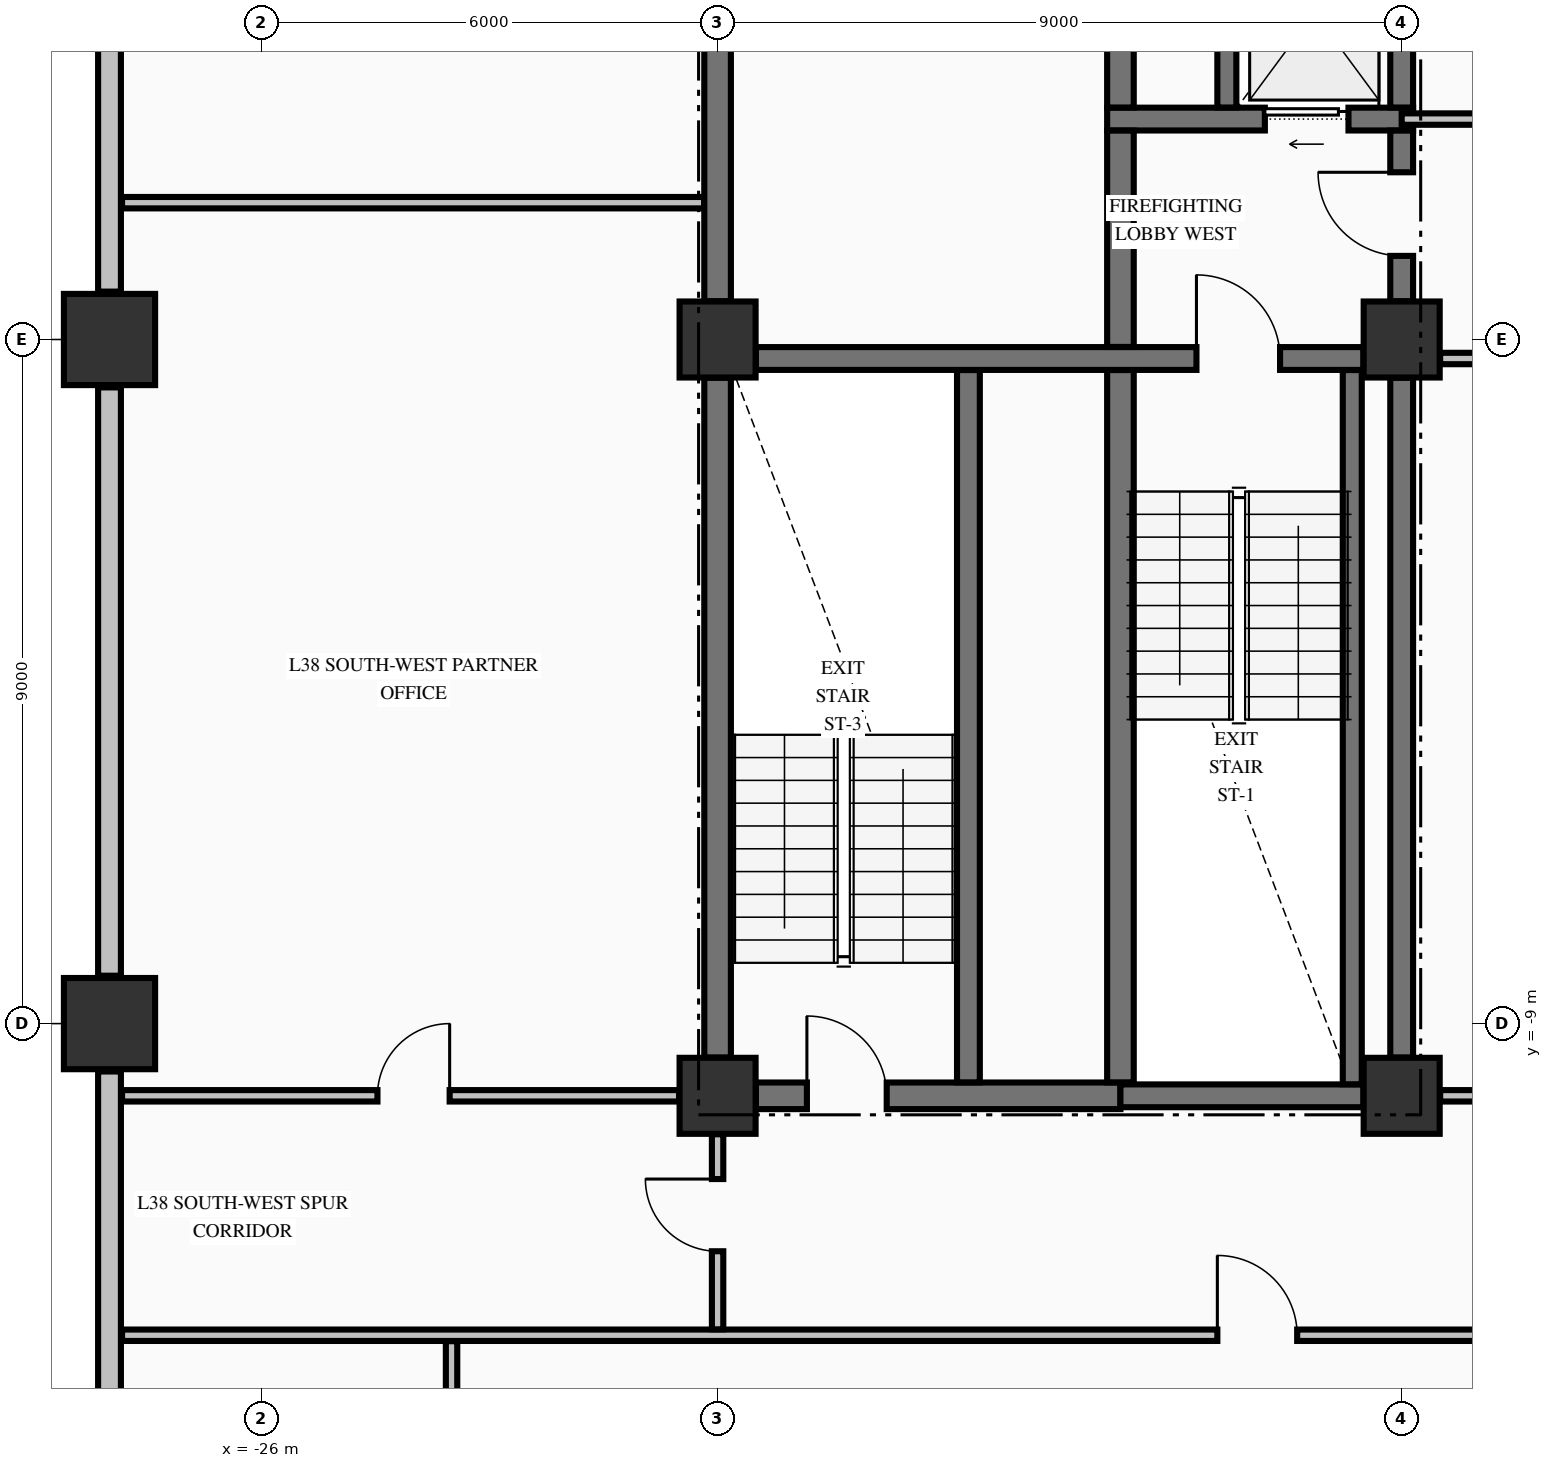
"""IFC4 building model, lengths in metres.
Left out: names, types, materials, properties, quantities, classifications, styles, units other than length and angle.
Written with IfcOpenShell. Run it as: python <this file> out.ifc"""

import sys

from ifc_helpers import new_model, si_unit, direction, frame, frame_2d, origin, origin_2d, place, context, subcontext, project, spatial, rectangle, extrude, element, fill, save


model = new_model("IFC4")
c1 = context("Model", 3, precision=1e-05, world=origin(), true_north=direction((0.0, 1.0)))
c2 = subcontext(c1, "Body", "Model", "MODEL_VIEW")
j1 = project(units=[si_unit("LENGTHUNIT", "METRE"), si_unit("PLANEANGLEUNIT", "RADIAN")], contexts=[c1])
p1 = place(None, origin())
s1 = spatial("IfcSite", under=j1, at=p1, CompositionType="ELEMENT")
p2 = place(p1, origin())
s2 = spatial("IfcBuilding", under=s1, at=p2, CompositionType="ELEMENT")
p3 = place(p2, frame((0.0, 0.0, 149.91)))
s3 = spatial("IfcBuildingStorey", under=s2, at=p3, CompositionType="ELEMENT", Elevation=149.91)
for number, where, z_axis, x_axis in (
    (1, (-28.0, -9.0, -0.25), (0.0, 0.0, 1.0), (1.0, 0.0, 0.0)),
    (2, (-28.0, 0.0, -0.25), (0.0, 0.0, 1.0), (1.0, 0.0, 0.0)),
):
    element("IfcColumn", number, at=place(p3, frame(where, z_axis=z_axis, x_axis=x_axis)), inside=s3, PredefinedType="COLUMN", context=c2, shape_type="SweptSolid", body=[
        extrude(rectangle(XDim=1.2, YDim=1.2, at=origin_2d()), origin(), (0.0, 0.0, 1.0), 3.395),
    ])
for number, where, z_axis, x_axis in (
    (3, (-20.0, -9.95, -0.25), (0.0, 0.0, 1.0), (1.0, 0.0, 0.0)),
    (4, (-11.0, -9.95, -0.25), (0.0, 0.0, 1.0), (1.0, 0.0, 0.0)),
    (5, (-11.0, 0.0, -0.25), (0.0, 0.0, 1.0), (1.0, 0.0, 0.0)),
    (6, (-20.0, 0.0, -0.25), (0.0, 0.0, 1.0), (1.0, 0.0, 0.0)),
):
    element("IfcColumn", number, at=place(p3, frame(where, z_axis=z_axis, x_axis=x_axis)), inside=s3, PredefinedType="COLUMN", context=c2, shape_type="SweptSolid", body=[
        extrude(rectangle(XDim=1.0, YDim=1.0, at=origin_2d()), origin(), (0.0, 0.0, 1.0), 3.395),
    ])
p4 = place(p3, frame((-28.0, -9.63, 0.0), z_axis=(0.0, 0.0, 1.0), x_axis=(0.0, -1.0, 0.0)))
e7 = element("IfcWall", 7, at=p4, inside=s3, PredefinedType="STANDARD", context=c2, shape_type="SweptSolid", body=[
    extrude(rectangle(XDim=10.74, YDim=0.3, at=frame_2d((5.37, 0.0))), origin(), (0.0, 0.0, 1.0), 2.537),
])
for number, where, z_axis, x_axis in (
    (8, (-28.0, -0.63, 0.0), (0.0, 0.0, 1.0), (0.0, -1.0, 0.0)),
    (9, (-28.0, 8.37, 0.0), (0.0, 0.0, 1.0), (0.0, -1.0, 0.0)),
):
    element("IfcWall", number, at=place(p3, frame(where, z_axis=z_axis, x_axis=x_axis)), inside=s3, PredefinedType="STANDARD", context=c2, shape_type="SweptSolid", body=[
        extrude(rectangle(XDim=7.74, YDim=0.3, at=frame_2d((3.87, 0.0))), origin(), (0.0, 0.0, 1.0), 2.537),
    ])
p5 = place(p3, frame((-19.496, -9.95, 0.0), z_axis=(0.0, 0.0, 1.0), x_axis=(1.0, 0.0, 0.0)))
e10 = element("IfcWall", 10, at=p5, inside=s3, PredefinedType="SHEAR", context=c2, shape_type="SweptSolid", body=[
    extrude(rectangle(XDim=4.796, YDim=0.35, at=frame_2d((2.398, 0.0))), origin(), (0.0, 0.0, 1.0), 3.145),
])
p6 = place(p5, frame((0.671, 0.0, 0.0)))
e11 = element("IfcOpeningElement", 11, at=p6, cuts=e10, PredefinedType="OPENING", context=c2, shape_type="SweptSolid", body=[
    extrude(rectangle(XDim=1.05, YDim=2.15, at=frame_2d((0.525, 1.075))), frame((0.0, 0.185, 0.0), z_axis=(0.0, -1.0, 0.0), x_axis=(1.0, 0.0, 0.0)), (0.0, 0.0, 1.0), 0.37),
])
p7 = place(p3, frame((-14.7, -9.95, 0.0), z_axis=(0.0, 0.0, 1.0), x_axis=(1.0, 0.0, 0.0)))
e12 = element("IfcWall", 12, at=p7, inside=s3, PredefinedType="SHEAR", context=c2, shape_type="SweptSolid", body=[
    extrude(rectangle(XDim=3.196, YDim=0.3, at=frame_2d((1.598, 0.0))), origin(), (0.0, 0.0, 1.0), 3.145),
])
p8 = place(p3, frame((-19.496, -0.25, 0.0), z_axis=(0.0, 0.0, 1.0), x_axis=(1.0, 0.0, 0.0)))
e13 = element("IfcWall", 13, at=p8, inside=s3, PredefinedType="SHEAR", context=c2, shape_type="SweptSolid", body=[
    extrude(rectangle(XDim=7.992, YDim=0.3, at=frame_2d((3.996, 0.0))), origin(), (0.0, 0.0, 1.0), 3.145),
])
p9 = place(p8, frame((5.796, 0.0, 0.0)))
e14 = element("IfcOpeningElement", 14, at=p9, cuts=e13, PredefinedType="OPENING", context=c2, shape_type="SweptSolid", body=[
    extrude(rectangle(XDim=1.1, YDim=2.15, at=frame_2d((0.55, 1.075))), frame((0.0, 0.16, 0.0), z_axis=(0.0, -1.0, 0.0), x_axis=(1.0, 0.0, 0.0)), (0.0, 0.0, 1.0), 0.32),
])
p10 = place(p3, frame((-14.875, 2.9, 0.0), z_axis=(0.0, 0.0, 1.0), x_axis=(1.0, 0.0, 0.0)))
e15 = element("IfcWall", 15, at=p10, inside=s3, PredefinedType="SHEAR", context=c2, shape_type="SweptSolid", body=[
    extrude(rectangle(XDim=4.025, YDim=0.3, at=frame_2d((2.012, 0.0))), origin(), (0.0, 0.0, 1.0), 3.145),
])
p11 = place(p10, frame((2.075, 0.0, 0.0)))
e16 = element("IfcOpeningElement", 16, at=p11, cuts=e15, PredefinedType="OPENING", context=c2, shape_type="SweptSolid", body=[
    extrude(rectangle(XDim=1.1, YDim=2.2, at=frame_2d((0.55, 1.1))), frame((0.0, 0.16, 0.0), z_axis=(0.0, -1.0, 0.0), x_axis=(1.0, 0.0, 0.0)), (0.0, 0.0, 1.0), 0.32),
])
p12 = place(p3, frame((-27.835, -13.1, 0.0), z_axis=(0.0, 0.0, 1.0), x_axis=(1.0, 0.0, 0.0)))
e17 = element("IfcWall", 17, at=p12, inside=s3, PredefinedType="PARTITIONING", context=c2, shape_type="SweptSolid", body=[
    extrude(rectangle(XDim=50.67, YDim=0.15, at=frame_2d((25.335, 0.0))), origin(), (0.0, 0.0, 1.0), 3.145),
])
p13 = place(p12, frame((29.685, 0.0, 0.0)))
e18 = element("IfcOpeningElement", 18, at=p13, cuts=e17, PredefinedType="OPENING", context=c2, shape_type="SweptSolid", body=[
    extrude(rectangle(XDim=1.1, YDim=2.15, at=frame_2d((0.55, 1.075))), frame((0.0, 0.085, 0.0), z_axis=(0.0, -1.0, 0.0), x_axis=(1.0, 0.0, 0.0)), (0.0, 0.0, 1.0), 0.17),
])
p14 = place(p12, frame((14.41, 0.0, 0.0)))
e19 = element("IfcOpeningElement", 19, at=p14, cuts=e17, PredefinedType="OPENING", context=c2, shape_type="SweptSolid", body=[
    extrude(rectangle(XDim=1.05, YDim=2.15, at=frame_2d((0.525, 1.075))), frame((0.0, 0.085, 0.0), z_axis=(0.0, -1.0, 0.0), x_axis=(1.0, 0.0, 0.0)), (0.0, 0.0, 1.0), 0.17),
])
p15 = place(p12, frame((34.96, 0.0, 0.0)))
e20 = element("IfcOpeningElement", 20, at=p15, cuts=e17, PredefinedType="OPENING", context=c2, shape_type="SweptSolid", body=[
    extrude(rectangle(XDim=1.05, YDim=2.15, at=frame_2d((0.525, 1.075))), frame((0.0, 0.085, 0.0), z_axis=(0.0, -1.0, 0.0), x_axis=(1.0, 0.0, 0.0)), (0.0, 0.0, 1.0), 0.17),
])
p16 = place(p3, frame((-27.835, -9.95, 0.0), z_axis=(0.0, 0.0, 1.0), x_axis=(1.0, 0.0, 0.0)))
e21 = element("IfcWall", 21, at=p16, inside=s3, PredefinedType="PARTITIONING", context=c2, shape_type="SweptSolid", body=[
    extrude(rectangle(XDim=7.329, YDim=0.15, at=frame_2d((3.665, 0.0))), origin(), (0.0, 0.0, 1.0), 3.145),
])
p17 = place(p16, frame((3.36, 0.0, 0.0)))
e22 = element("IfcOpeningElement", 22, at=p17, cuts=e21, PredefinedType="OPENING", context=c2, shape_type="SweptSolid", body=[
    extrude(rectangle(XDim=0.95, YDim=2.15, at=frame_2d((0.475, 1.075))), frame((0.0, 0.085, 0.0), z_axis=(0.0, -1.0, 0.0), x_axis=(1.0, 0.0, 0.0)), (0.0, 0.0, 1.0), 0.17),
])
p18 = place(p3, frame((-10.494, -9.95, 0.0), z_axis=(0.0, 0.0, 1.0), x_axis=(1.0, 0.0, 0.0)))
e23 = element("IfcWall", 23, at=p18, inside=s3, PredefinedType="PARTITIONING", context=c2, shape_type="SweptSolid", body=[
    extrude(rectangle(XDim=20.988, YDim=0.15, at=frame_2d((10.494, 0.0))), origin(), (0.0, 0.0, 1.0), 3.145),
])
p19 = place(p18, frame((13.994, 0.0, 0.0)))
e24 = element("IfcOpeningElement", 24, at=p19, cuts=e23, PredefinedType="OPENING", context=c2, shape_type="SweptSolid", body=[
    extrude(rectangle(XDim=1.1, YDim=2.15, at=frame_2d((0.55, 1.075))), frame((0.0, 0.085, 0.0), z_axis=(0.0, -1.0, 0.0), x_axis=(1.0, 0.0, 0.0)), (0.0, 0.0, 1.0), 0.17),
])
p20 = place(p18, frame((19.489, 0.0, 0.0)))
e25 = element("IfcOpeningElement", 25, at=p20, cuts=e23, PredefinedType="OPENING", context=c2, shape_type="SweptSolid", body=[
    extrude(rectangle(XDim=0.95, YDim=2.15, at=frame_2d((0.475, 1.075))), frame((0.0, 0.085, 0.0), z_axis=(0.0, -1.0, 0.0), x_axis=(1.0, 0.0, 0.0)), (0.0, 0.0, 1.0), 0.17),
])
p21 = place(p3, frame((-10.494, -0.25, 0.0), z_axis=(0.0, 0.0, 1.0), x_axis=(1.0, 0.0, 0.0)))
e26 = element("IfcWall", 26, at=p21, inside=s3, PredefinedType="PARTITIONING", context=c2, shape_type="SweptSolid", body=[
    extrude(rectangle(XDim=20.988, YDim=0.15, at=frame_2d((10.494, 0.0))), origin(), (0.0, 0.0, 1.0), 3.145),
])
p22 = place(p21, frame((13.994, 0.0, 0.0)))
e27 = element("IfcOpeningElement", 27, at=p22, cuts=e26, PredefinedType="OPENING", context=c2, shape_type="SweptSolid", body=[
    extrude(rectangle(XDim=1.1, YDim=2.15, at=frame_2d((0.55, 1.075))), frame((0.0, 0.085, 0.0), z_axis=(0.0, -1.0, 0.0), x_axis=(1.0, 0.0, 0.0)), (0.0, 0.0, 1.0), 0.17),
])
p23 = place(p21, frame((5.939, 0.0, 0.0)))
e28 = element("IfcOpeningElement", 28, at=p23, cuts=e26, PredefinedType="OPENING", context=c2, shape_type="SweptSolid", body=[
    extrude(rectangle(XDim=1.05, YDim=2.15, at=frame_2d((0.525, 1.075))), frame((0.0, 0.085, 0.0), z_axis=(0.0, -1.0, 0.0), x_axis=(1.0, 0.0, 0.0)), (0.0, 0.0, 1.0), 0.17),
])
p24 = place(p21, frame((18.089, 0.0, 0.0)))
e29 = element("IfcOpeningElement", 29, at=p24, cuts=e26, PredefinedType="OPENING", context=c2, shape_type="SweptSolid", body=[
    extrude(rectangle(XDim=0.95, YDim=2.15, at=frame_2d((0.475, 1.075))), frame((0.0, 0.085, 0.0), z_axis=(0.0, -1.0, 0.0), x_axis=(1.0, 0.0, 0.0)), (0.0, 0.0, 1.0), 0.17),
])
p25 = place(p3, frame((-27.835, 1.8, 0.0), z_axis=(0.0, 0.0, 1.0), x_axis=(1.0, 0.0, 0.0)))
e30 = element("IfcWall", 30, at=p25, inside=s3, PredefinedType="PARTITIONING", context=c2, shape_type="SweptSolid", body=[
    extrude(rectangle(XDim=7.657, YDim=0.15, at=frame_2d((3.829, 0.0))), origin(), (0.0, 0.0, 1.0), 3.145),
])
p26 = place(p3, frame((-11.0, 2.9, 0.0), z_axis=(0.0, 0.0, 1.0), x_axis=(1.0, 0.0, 0.0)))
e31 = element("IfcWall", 31, at=p26, inside=s3, PredefinedType="PARTITIONING", context=c2, shape_type="SweptSolid", body=[
    extrude(rectangle(XDim=22.0, YDim=0.15, at=frame_2d((11.0, 0.0))), origin(), (0.0, 0.0, 1.0), 3.145),
])
p27 = place(p26, frame((14.5, 0.0, 0.0)))
e32 = element("IfcOpeningElement", 32, at=p27, cuts=e31, PredefinedType="OPENING", context=c2, shape_type="SweptSolid", body=[
    extrude(rectangle(XDim=1.1, YDim=2.15, at=frame_2d((0.55, 1.075))), frame((0.0, 0.085, 0.0), z_axis=(0.0, -1.0, 0.0), x_axis=(1.0, 0.0, 0.0)), (0.0, 0.0, 1.0), 0.17),
])
p28 = place(p26, frame((6.445, 0.0, 0.0)))
e33 = element("IfcOpeningElement", 33, at=p28, cuts=e31, PredefinedType="OPENING", context=c2, shape_type="SweptSolid", body=[
    extrude(rectangle(XDim=1.05, YDim=2.15, at=frame_2d((0.525, 1.075))), frame((0.0, 0.085, 0.0), z_axis=(0.0, -1.0, 0.0), x_axis=(1.0, 0.0, 0.0)), (0.0, 0.0, 1.0), 0.17),
])
p29 = place(p26, frame((18.52, 0.0, 0.0)))
e34 = element("IfcOpeningElement", 34, at=p29, cuts=e31, PredefinedType="OPENING", context=c2, shape_type="SweptSolid", body=[
    extrude(rectangle(XDim=1.1, YDim=2.15, at=frame_2d((0.55, 1.075))), frame((0.0, 0.085, 0.0), z_axis=(0.0, -1.0, 0.0), x_axis=(1.0, 0.0, 0.0)), (0.0, 0.0, 1.0), 0.17),
])
p30 = place(p3, frame((-20.0, -9.446, 0.0), z_axis=(0.0, 0.0, 1.0), x_axis=(0.0, 1.0, 0.0)))
e35 = element("IfcWall", 35, at=p30, inside=s3, PredefinedType="SHEAR", context=c2, shape_type="SweptSolid", body=[
    extrude(rectangle(XDim=8.942, YDim=0.35, at=frame_2d((4.471, 0.0))), origin(), (0.0, 0.0, 1.0), 3.145),
])
p31 = place(p3, frame((-20.0, 0.504, 0.0), z_axis=(0.0, 0.0, 1.0), x_axis=(0.0, 1.0, 0.0)))
e36 = element("IfcWall", 36, at=p31, inside=s3, PredefinedType="SHEAR", context=c2, shape_type="SweptSolid", body=[
    extrude(rectangle(XDim=9.492, YDim=0.35, at=frame_2d((4.746, 0.0))), origin(), (0.0, 0.0, 1.0), 3.145),
])
p32 = place(p3, frame((-16.7, -9.773, 0.0), z_axis=(0.0, 0.0, 1.0), x_axis=(0.0, 1.0, 0.0)))
e37 = element("IfcWall", 37, at=p32, inside=s3, PredefinedType="SHEAR", context=c2, shape_type="SweptSolid", body=[
    extrude(rectangle(XDim=9.371, YDim=0.3, at=frame_2d((4.686, 0.0))), origin(), (0.0, 0.0, 1.0), 3.145),
])
p33 = place(p3, frame((-14.7, -9.773, 0.0), z_axis=(0.0, 0.0, 1.0), x_axis=(0.0, 1.0, 0.0)))
e38 = element("IfcWall", 38, at=p33, inside=s3, PredefinedType="SHEAR", context=c2, shape_type="SweptSolid", body=[
    extrude(rectangle(XDim=9.371, YDim=0.35, at=frame_2d((4.686, 0.0))), origin(), (0.0, 0.0, 1.0), 3.145),
])
p34 = place(p3, frame((-14.7, -0.098, 0.0), z_axis=(0.0, 0.0, 1.0), x_axis=(0.0, 1.0, 0.0)))
e39 = element("IfcWall", 39, at=p34, inside=s3, PredefinedType="SHEAR", context=c2, shape_type="SweptSolid", body=[
    extrude(rectangle(XDim=2.846, YDim=0.35, at=frame_2d((1.423, 0.0))), origin(), (0.0, 0.0, 1.0), 3.145),
])
p35 = place(p3, frame((-14.7, 3.052, 0.0), z_axis=(0.0, 0.0, 1.0), x_axis=(0.0, 1.0, 0.0)))
e40 = element("IfcWall", 40, at=p35, inside=s3, PredefinedType="SHEAR", context=c2, shape_type="SweptSolid", body=[
    extrude(rectangle(XDim=2.496, YDim=0.35, at=frame_2d((1.248, 0.0))), origin(), (0.0, 0.0, 1.0), 3.145),
])
p36 = place(p3, frame((-13.3, 3.052, 0.0), z_axis=(0.0, 0.0, 1.0), x_axis=(0.0, 1.0, 0.0)))
e41 = element("IfcWall", 41, at=p36, inside=s3, PredefinedType="SOLIDWALL", context=c2, shape_type="SweptSolid", body=[
    extrude(rectangle(XDim=2.496, YDim=0.25, at=frame_2d((1.248, 0.0))), origin(), (0.0, 0.0, 1.0), 3.145),
])
p37 = place(p3, frame((-11.65, -9.798, 0.0), z_axis=(0.0, 0.0, 1.0), x_axis=(0.0, 1.0, 0.0)))
e42 = element("IfcWall", 42, at=p37, inside=s3, PredefinedType="SOLIDWALL", context=c2, shape_type="SweptSolid", body=[
    extrude(rectangle(XDim=9.396, YDim=0.25, at=frame_2d((4.698, 0.0))), origin(), (0.0, 0.0, 1.0), 3.145),
])
p38 = place(p3, frame((-11.0, -9.446, 0.0), z_axis=(0.0, 0.0, 1.0), x_axis=(0.0, 1.0, 0.0)))
e43 = element("IfcWall", 43, at=p38, inside=s3, PredefinedType="SHEAR", context=c2, shape_type="SweptSolid", body=[
    extrude(rectangle(XDim=8.942, YDim=0.3, at=frame_2d((4.471, 0.0))), origin(), (0.0, 0.0, 1.0), 3.145),
])
p39 = place(p3, frame((-11.0, 0.504, 0.0), z_axis=(0.0, 0.0, 1.0), x_axis=(0.0, 1.0, 0.0)))
e44 = element("IfcWall", 44, at=p39, inside=s3, PredefinedType="SHEAR", context=c2, shape_type="SweptSolid", body=[
    extrude(rectangle(XDim=2.244, YDim=0.3, at=frame_2d((1.122, 0.0))), origin(), (0.0, 0.0, 1.0), 3.145),
])
p40 = place(p39, frame((0.596, 0.0, 0.0)))
e45 = element("IfcOpeningElement", 45, at=p40, cuts=e44, PredefinedType="OPENING", context=c2, shape_type="SweptSolid", body=[
    extrude(rectangle(XDim=1.1, YDim=2.15, at=frame_2d((0.55, 1.075))), frame((0.0, 0.16, 0.0), z_axis=(0.0, -1.0, 0.0), x_axis=(1.0, 0.0, 0.0)), (0.0, 0.0, 1.0), 0.32),
])
p41 = place(p3, frame((-11.0, 3.052, 0.0), z_axis=(0.0, 0.0, 1.0), x_axis=(0.0, 1.0, 0.0)))
e46 = element("IfcWall", 46, at=p41, inside=s3, PredefinedType="SHEAR", context=c2, shape_type="SweptSolid", body=[
    extrude(rectangle(XDim=2.496, YDim=0.3, at=frame_2d((1.248, 0.0))), origin(), (0.0, 0.0, 1.0), 3.145),
])
p42 = place(p3, frame((-23.5, -20.394, 0.0), z_axis=(0.0, 0.0, 1.0), x_axis=(0.0, 1.0, 0.0)))
e47 = element("IfcWall", 47, at=p42, inside=s3, PredefinedType="PARTITIONING", context=c2, shape_type="SweptSolid", body=[
    extrude(rectangle(XDim=7.216, YDim=0.15, at=frame_2d((3.608, 0.0))), origin(), (0.0, 0.0, 1.0), 3.145),
])
p43 = place(p3, frame((-20.0, -13.022, 0.0), z_axis=(0.0, 0.0, 1.0), x_axis=(0.0, 1.0, 0.0)))
e48 = element("IfcWall", 48, at=p43, inside=s3, PredefinedType="PARTITIONING", context=c2, shape_type="SweptSolid", body=[
    extrude(rectangle(XDim=2.566, YDim=0.15, at=frame_2d((1.283, 0.0))), origin(), (0.0, 0.0, 1.0), 2.635),
])
p44 = place(p43, frame((1.027, 0.0, 0.0)))
e49 = element("IfcOpeningElement", 49, at=p44, cuts=e48, PredefinedType="OPENING", context=c2, shape_type="SweptSolid", body=[
    extrude(rectangle(XDim=0.95, YDim=2.15, at=frame_2d((0.475, 1.075))), frame((0.0, 0.085, 0.0), z_axis=(0.0, -1.0, 0.0), x_axis=(1.0, 0.0, 0.0)), (0.0, 0.0, 1.0), 0.17),
])
p45 = place(p9, origin())
e50 = element("IfcDoor", 50, at=p45, inside=s3, OperationType="SINGLE_SWING_LEFT", PredefinedType="DOOR", context=c2, shape_type="SweptSolid", body=[
    extrude(rectangle(XDim=1.1, YDim=2.15, at=frame_2d((0.55, 1.075))), frame((0.0, 0.025, 0.0), z_axis=(0.0, -1.0, 0.0), x_axis=(1.0, 0.0, 0.0)), (0.0, 0.0, 1.0), 0.05),
])
fill(e14, e50)
p46 = place(p40, origin())
e51 = element("IfcDoor", 51, at=p46, inside=s3, OperationType="SINGLE_SWING_RIGHT", PredefinedType="DOOR", context=c2, shape_type="SweptSolid", body=[
    extrude(rectangle(XDim=1.1, YDim=2.15, at=frame_2d((0.55, 1.075))), frame((0.0, 0.025, 0.0), z_axis=(0.0, -1.0, 0.0), x_axis=(1.0, 0.0, 0.0)), (0.0, 0.0, 1.0), 0.05),
])
fill(e45, e51)
p47 = place(p11, origin())
e52 = element("IfcDoor", 52, at=p47, inside=s3, OperationType="SLIDING_TO_LEFT", PredefinedType="DOOR", context=c2, shape_type="SweptSolid", body=[
    extrude(rectangle(XDim=1.1, YDim=2.2, at=frame_2d((0.55, 1.1))), frame((0.0, 0.025, 0.0), z_axis=(0.0, -1.0, 0.0), x_axis=(1.0, 0.0, 0.0)), (0.0, 0.0, 1.0), 0.05),
])
fill(e16, e52)
p48 = place(p6, origin())
e53 = element("IfcDoor", 53, at=p48, inside=s3, OperationType="SINGLE_SWING_LEFT", PredefinedType="DOOR", context=c2, shape_type="SweptSolid", body=[
    extrude(rectangle(XDim=1.05, YDim=2.15, at=frame_2d((0.525, 1.075))), frame((0.0, 0.025, 0.0), z_axis=(0.0, -1.0, 0.0), x_axis=(1.0, 0.0, 0.0)), (0.0, 0.0, 1.0), 0.05),
])
fill(e11, e53)
p49 = place(p14, origin())
e54 = element("IfcDoor", 54, at=p49, inside=s3, OperationType="SINGLE_SWING_LEFT", PredefinedType="DOOR", context=c2, shape_type="SweptSolid", body=[
    extrude(rectangle(XDim=1.05, YDim=2.15, at=frame_2d((0.525, 1.075))), frame((0.0, 0.025, 0.0), z_axis=(0.0, -1.0, 0.0), x_axis=(1.0, 0.0, 0.0)), (0.0, 0.0, 1.0), 0.05),
])
fill(e19, e54)
p50 = place(p44, origin())
e55 = element("IfcDoor", 55, at=p50, inside=s3, OperationType="SINGLE_SWING_RIGHT", PredefinedType="DOOR", context=c2, shape_type="SweptSolid", body=[
    extrude(rectangle(XDim=0.95, YDim=2.15, at=frame_2d((0.475, 1.075))), frame((0.0, 0.025, 0.0), z_axis=(0.0, -1.0, 0.0), x_axis=(1.0, 0.0, 0.0)), (0.0, 0.0, 1.0), 0.05),
])
fill(e49, e55)
p51 = place(p17, origin())
e56 = element("IfcDoor", 56, at=p51, inside=s3, OperationType="SINGLE_SWING_RIGHT", PredefinedType="DOOR", context=c2, shape_type="SweptSolid", body=[
    extrude(rectangle(XDim=0.95, YDim=2.15, at=frame_2d((0.475, 1.075))), frame((0.0, 0.025, 0.0), z_axis=(0.0, -1.0, 0.0), x_axis=(1.0, 0.0, 0.0)), (0.0, 0.0, 1.0), 0.05),
])
fill(e22, e56)
save(model, sys.argv[1])
